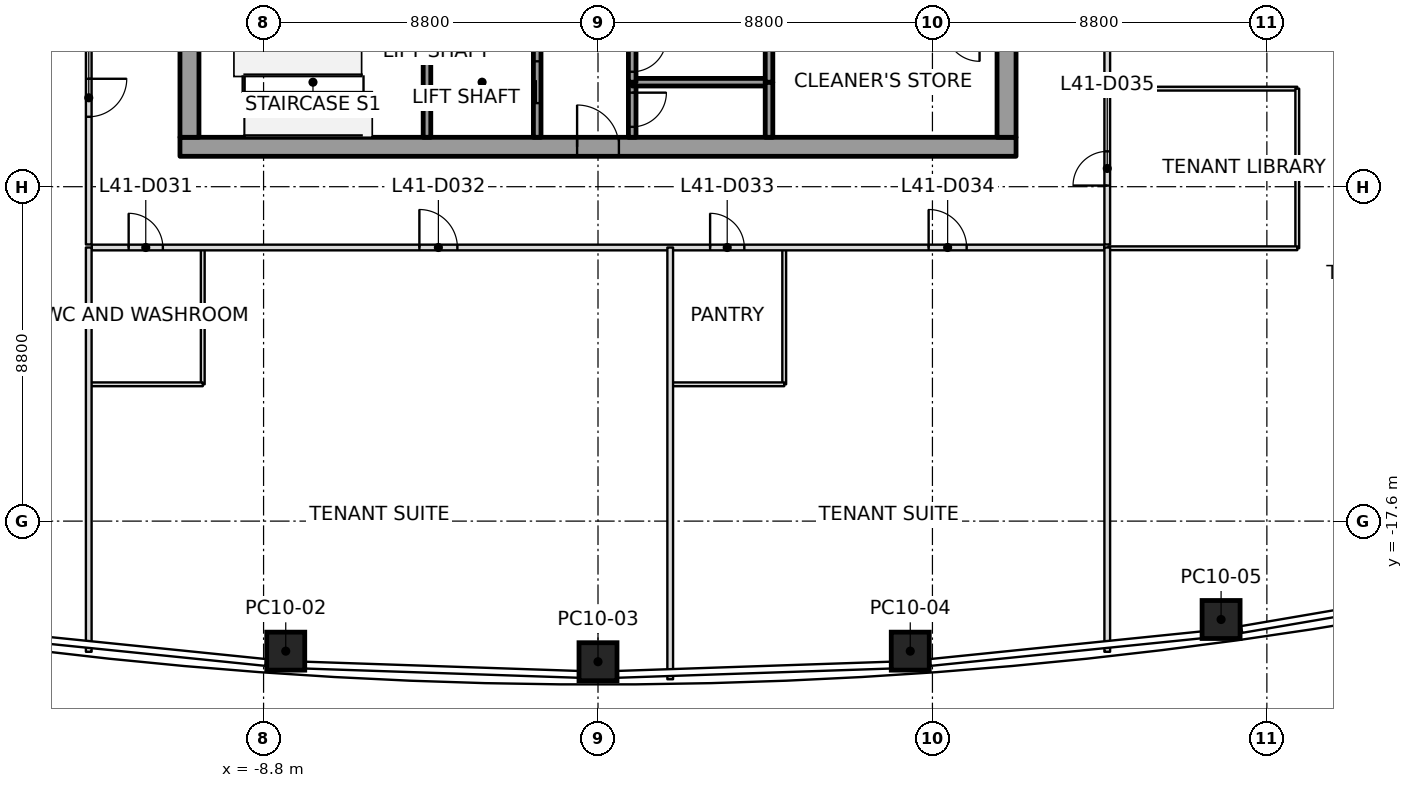
"""IFC4 building model, lengths in metres.
Left out: names, types, materials, properties, quantities, classifications, styles, units other than length and angle.
Written with IfcOpenShell. Run it as: python <this file> out.ifc"""

import sys

from ifc_helpers import new_model, si_unit, direction, frame, frame_2d, origin, origin_2d, place, context, subcontext, project, spatial, rectangle, extrude, element, fill, save


model = new_model("IFC4")
c1 = context("Model", 3, precision=1e-05, world=origin(), true_north=direction((0.0, 1.0)))
c2 = subcontext(c1, "Body", "Model", "MODEL_VIEW")
j1 = project(units=[si_unit("LENGTHUNIT", "METRE"), si_unit("PLANEANGLEUNIT", "RADIAN")], contexts=[c1])
p1 = place(None, origin())
s1 = spatial("IfcSite", under=j1, at=p1, CompositionType="ELEMENT")
p2 = place(p1, origin())
s2 = spatial("IfcBuilding", under=s1, at=p2, CompositionType="ELEMENT")
p3 = place(p2, frame((0.0, 0.0, 185.8)))
s3 = spatial("IfcBuildingStorey", under=s2, at=p3, CompositionType="ELEMENT", Elevation=185.8)
p4 = place(p3, frame((-8.217, -21.022, 0.0), z_axis=(0.008849199152, 0.01116829962, 0.999898475225), x_axis=(-0.99767373409, 0.067690026589, 0.008073450719)))
e1 = element("IfcColumn", 1, at=p4, inside=s3, PredefinedType="COLUMN", context=c2, shape_type="SweptSolid", body=[
    extrude(rectangle(XDim=1.0, YDim=1.0, at=origin_2d()), origin(), (0.0, 0.0, 1.0), 4.0),
])
p5 = place(p3, frame((0.0, -21.3, 0.0), z_axis=(0.0, 0.01141283087, 0.999934871525), x_axis=(1.0, 0.0, 0.0)))
e2 = element("IfcColumn", 2, at=p5, inside=s3, PredefinedType="COLUMN", context=c2, shape_type="SweptSolid", body=[
    extrude(rectangle(XDim=1.0, YDim=1.0, at=origin_2d()), origin(), (0.0, 0.0, 1.0), 4.0),
])
p6 = place(p3, frame((8.217, -21.022, 0.0), z_axis=(-0.008849199152, 0.01116829962, 0.999898475225), x_axis=(0.99767373409, 0.067690026589, 0.008073450719)))
e3 = element("IfcColumn", 3, at=p6, inside=s3, PredefinedType="COLUMN", context=c2, shape_type="SweptSolid", body=[
    extrude(rectangle(XDim=1.0, YDim=1.0, at=origin_2d()), origin(), (0.0, 0.0, 1.0), 4.0),
])
p7 = place(p3, frame((16.396, -20.189, 0.0), z_axis=(-0.017635456472, 0.010434820265, 0.999790030557), x_axis=(0.990707564841, 0.135057082861, 0.016065657048)))
e4 = element("IfcColumn", 4, at=p7, inside=s3, PredefinedType="COLUMN", context=c2, shape_type="SweptSolid", body=[
    extrude(rectangle(XDim=1.0, YDim=1.0, at=origin_2d()), origin(), (0.0, 0.0, 1.0), 4.001),
])
p8 = place(p3, frame((-11.0, -7.75, 0.0), z_axis=(0.0, 0.0, 1.0), x_axis=(1.0, 0.0, 0.0)))
e5 = element("IfcWall", 5, at=p8, inside=s3, PredefinedType="SHEAR", context=c2, shape_type="SweptSolid", body=[
    extrude(rectangle(XDim=22.0, YDim=0.5, at=frame_2d((11.0, 0.0))), origin(), (0.0, 0.0, 1.0), 4.0),
])
p9 = place(p8, frame((10.45, 0.0, 0.0)))
e6 = element("IfcOpeningElement", 6, at=p9, cuts=e5, PredefinedType="OPENING", context=c2, shape_type="SweptSolid", body=[
    extrude(rectangle(XDim=1.1, YDim=2.1, at=frame_2d((0.55, 1.05))), frame((0.0, 0.25, 0.0), z_axis=(0.0, -1.0, 0.0), x_axis=(1.0, 0.0, 0.0)), (0.0, 0.0, 1.0), 0.5),
])
p10 = place(p3, frame((-10.75, -7.5, 0.0), z_axis=(0.0, 0.0, 1.0), x_axis=(0.0, 1.0, 0.0)))
e7 = element("IfcWall", 7, at=p10, inside=s3, PredefinedType="SHEAR", context=c2, shape_type="SweptSolid", body=[
    extrude(rectangle(XDim=15.0, YDim=0.5, at=frame_2d((7.5, 0.0))), origin(), (0.0, 0.0, 1.0), 4.0),
])
p11 = place(p10, frame((6.6, 0.0, 0.0)))
e8 = element("IfcOpeningElement", 8, at=p11, cuts=e7, PredefinedType="OPENING", context=c2, shape_type="SweptSolid", body=[
    extrude(rectangle(XDim=1.8, YDim=2.1, at=frame_2d((0.9, 1.05))), frame((0.0, 0.25, 0.0), z_axis=(0.0, -1.0, 0.0), x_axis=(1.0, 0.0, 0.0)), (0.0, 0.0, 1.0), 0.5),
])
p12 = place(p3, frame((10.75, -7.5, 0.0), z_axis=(0.0, 0.0, 1.0), x_axis=(0.0, 1.0, 0.0)))
e9 = element("IfcWall", 9, at=p12, inside=s3, PredefinedType="SHEAR", context=c2, shape_type="SweptSolid", body=[
    extrude(rectangle(XDim=15.0, YDim=0.5, at=frame_2d((7.5, 0.0))), origin(), (0.0, 0.0, 1.0), 4.0),
])
p13 = place(p12, frame((6.6, 0.0, 0.0)))
e10 = element("IfcOpeningElement", 10, at=p13, cuts=e9, PredefinedType="OPENING", context=c2, shape_type="SweptSolid", body=[
    extrude(rectangle(XDim=1.8, YDim=2.1, at=frame_2d((0.9, 1.05))), frame((0.0, 0.25, 0.0), z_axis=(0.0, -1.0, 0.0), x_axis=(1.0, 0.0, 0.0)), (0.0, 0.0, 1.0), 0.5),
])
p14 = place(p3, frame((-4.5, -4.6, 0.0), z_axis=(0.0, 0.0, 1.0), x_axis=(0.0, -1.0, 0.0)))
e11 = element("IfcWall", 11, at=p14, inside=s3, PredefinedType="SOLIDWALL", context=c2, shape_type="SweptSolid", body=[
    extrude(rectangle(XDim=2.9, YDim=0.2, at=frame_2d((1.45, 0.0))), origin(), (0.0, 0.0, 1.0), 3.85),
])
p15 = place(p3, frame((-1.6, -7.5, 0.0), z_axis=(0.0, 0.0, 1.0), x_axis=(0.0, 1.0, 0.0)))
e12 = element("IfcWall", 12, at=p15, inside=s3, PredefinedType="SOLIDWALL", context=c2, shape_type="SweptSolid", body=[
    extrude(rectangle(XDim=2.9, YDim=0.2, at=frame_2d((1.45, 0.0))), origin(), (0.0, 0.0, 1.0), 3.85),
])
p16 = place(p15, frame((0.9, 0.0, 0.0)))
e13 = element("IfcOpeningElement", 13, at=p16, cuts=e12, PredefinedType="OPENING", context=c2, shape_type="SweptSolid", body=[
    extrude(rectangle(XDim=1.1, YDim=2.1, at=frame_2d((0.55, 1.05))), frame((0.0, 0.1, 0.0), z_axis=(0.0, -1.0, 0.0), x_axis=(1.0, 0.0, 0.0)), (0.0, 0.0, 1.0), 0.2),
])
p17 = place(p3, frame((0.9, -6.05, 0.0), z_axis=(0.0, 0.0, 1.0), x_axis=(0.0, -1.0, 0.0)))
e14 = element("IfcWall", 14, at=p17, inside=s3, PredefinedType="SOLIDWALL", context=c2, shape_type="SweptSolid", body=[
    extrude(rectangle(XDim=1.45, YDim=0.2, at=frame_2d((0.725, 0.0))), origin(), (0.0, 0.0, 1.0), 3.85),
])
p18 = place(p17, frame((0.275, 0.0, 0.0)))
e15 = element("IfcOpeningElement", 15, at=p18, cuts=e14, PredefinedType="OPENING", context=c2, shape_type="SweptSolid", body=[
    extrude(rectangle(XDim=0.9, YDim=2.1, at=frame_2d((0.45, 1.05))), frame((0.0, 0.1, 0.0), z_axis=(0.0, -1.0, 0.0), x_axis=(1.0, 0.0, 0.0)), (0.0, 0.0, 1.0), 0.2),
])
p19 = place(p3, frame((4.5, -6.05, 0.0), z_axis=(0.0, 0.0, 1.0), x_axis=(-1.0, 0.0, 0.0)))
e16 = element("IfcWall", 16, at=p19, inside=s3, PredefinedType="SOLIDWALL", context=c2, shape_type="SweptSolid", body=[
    extrude(rectangle(XDim=3.6, YDim=0.2, at=frame_2d((1.8, 0.0))), origin(), (0.0, 0.0, 1.0), 3.85),
])
p20 = place(p3, frame((0.9, -4.6, 0.0), z_axis=(0.0, 0.0, 1.0), x_axis=(0.0, -1.0, 0.0)))
e17 = element("IfcWall", 17, at=p20, inside=s3, PredefinedType="SOLIDWALL", context=c2, shape_type="SweptSolid", body=[
    extrude(rectangle(XDim=1.45, YDim=0.2, at=frame_2d((0.725, 0.0))), origin(), (0.0, 0.0, 1.0), 3.85),
])
p21 = place(p20, frame((0.275, 0.0, 0.0)))
e18 = element("IfcOpeningElement", 18, at=p21, cuts=e17, PredefinedType="OPENING", context=c2, shape_type="SweptSolid", body=[
    extrude(rectangle(XDim=0.9, YDim=2.1, at=frame_2d((0.45, 1.05))), frame((0.0, 0.1, 0.0), z_axis=(0.0, -1.0, 0.0), x_axis=(1.0, 0.0, 0.0)), (0.0, 0.0, 1.0), 0.2),
])
for number, where, z_axis, x_axis in (
    (19, (4.5, -6.05, 0.0), (0.0, 0.0, 1.0), (0.0, -1.0, 0.0)),
    (20, (4.5, -4.6, 0.0), (0.0, 0.0, 1.0), (0.0, -1.0, 0.0)),
):
    element("IfcWall", number, at=place(p3, frame(where, z_axis=z_axis, x_axis=x_axis)), inside=s3, PredefinedType="SOLIDWALL", context=c2, shape_type="SweptSolid", body=[
        extrude(rectangle(XDim=1.45, YDim=0.2, at=frame_2d((0.725, 0.0))), origin(), (0.0, 0.0, 1.0), 3.85),
    ])
p22 = place(p3, frame((-13.4, -10.4, 0.0), z_axis=(0.0, 0.0, 1.0), x_axis=(0.0, -1.0, 0.0)))
e21 = element("IfcWall", 21, at=p22, inside=s3, PredefinedType="PARTITIONING", context=c2, shape_type="SweptSolid", body=[
    extrude(rectangle(XDim=10.639, YDim=0.15, at=frame_2d((5.319, 0.0))), origin(), (0.0, 0.0, 1.0), 3.234),
])
p23 = place(p3, frame((1.9, -10.4, 0.0), z_axis=(0.0, 0.0, 1.0), x_axis=(0.0, -1.0, 0.0)))
e22 = element("IfcWall", 22, at=p23, inside=s3, PredefinedType="PARTITIONING", context=c2, shape_type="SweptSolid", body=[
    extrude(rectangle(XDim=11.361, YDim=0.15, at=frame_2d((5.681, 0.0))), origin(), (0.0, 0.0, 1.0), 3.234),
])
p24 = place(p3, frame((13.4, -10.4, 0.0), z_axis=(0.0, 0.0, 1.0), x_axis=(0.0, -1.0, 0.0)))
e23 = element("IfcWall", 23, at=p24, inside=s3, PredefinedType="PARTITIONING", context=c2, shape_type="SweptSolid", body=[
    extrude(rectangle(XDim=10.639, YDim=0.15, at=frame_2d((5.319, 0.0))), origin(), (0.0, 0.0, 1.0), 3.234),
])
p25 = place(p3, frame((-13.4, 10.32, 0.0), z_axis=(0.0, 0.0, 1.0), x_axis=(0.0, -1.0, 0.0)))
e24 = element("IfcWall", 24, at=p25, inside=s3, PredefinedType="PARTITIONING", context=c2, shape_type="SweptSolid", body=[
    extrude(rectangle(XDim=20.64, YDim=0.15, at=frame_2d((10.32, 0.0))), origin(), (0.0, 0.0, 1.0), 3.097),
])
p26 = place(p25, frame((3.32, 0.0, 0.0)))
e25 = element("IfcOpeningElement", 25, at=p26, cuts=e24, PredefinedType="OPENING", context=c2, shape_type="SweptSolid", body=[
    extrude(rectangle(XDim=1.0, YDim=2.1, at=frame_2d((0.5, 1.05))), frame((0.0, 0.075, 0.0), z_axis=(0.0, -1.0, 0.0), x_axis=(1.0, 0.0, 0.0)), (0.0, 0.0, 1.0), 0.15),
])
p27 = place(p25, frame((9.77, 0.0, 0.0)))
e26 = element("IfcOpeningElement", 26, at=p27, cuts=e24, PredefinedType="OPENING", context=c2, shape_type="SweptSolid", body=[
    extrude(rectangle(XDim=0.9, YDim=2.1, at=frame_2d((0.45, 1.05))), frame((0.0, 0.075, 0.0), z_axis=(0.0, -1.0, 0.0), x_axis=(1.0, 0.0, 0.0)), (0.0, 0.0, 1.0), 0.15),
])
p28 = place(p25, frame((16.28, 0.0, 0.0)))
e27 = element("IfcOpeningElement", 27, at=p28, cuts=e24, PredefinedType="OPENING", context=c2, shape_type="SweptSolid", body=[
    extrude(rectangle(XDim=1.0, YDim=2.1, at=frame_2d((0.5, 1.05))), frame((0.0, 0.075, 0.0), z_axis=(0.0, -1.0, 0.0), x_axis=(1.0, 0.0, 0.0)), (0.0, 0.0, 1.0), 0.15),
])
p29 = place(p3, frame((-13.32, -10.4, 0.0), z_axis=(0.0, 0.0, 1.0), x_axis=(1.0, 0.0, 0.0)))
e28 = element("IfcWall", 28, at=p29, inside=s3, PredefinedType="PARTITIONING", context=c2, shape_type="SweptSolid", body=[
    extrude(rectangle(XDim=26.64, YDim=0.15, at=frame_2d((13.32, 0.0))), origin(), (0.0, 0.0, 1.0), 3.3),
])
p30 = place(p29, frame((0.97, 0.0, 0.0)))
e29 = element("IfcOpeningElement", 29, at=p30, cuts=e28, PredefinedType="OPENING", context=c2, shape_type="SweptSolid", body=[
    extrude(rectangle(XDim=0.9, YDim=2.1, at=frame_2d((0.45, 1.05))), frame((0.0, 0.075, 0.0), z_axis=(0.0, -1.0, 0.0), x_axis=(1.0, 0.0, 0.0)), (0.0, 0.0, 1.0), 0.15),
])
p31 = place(p29, frame((8.62, 0.0, 0.0)))
e30 = element("IfcOpeningElement", 30, at=p31, cuts=e28, PredefinedType="OPENING", context=c2, shape_type="SweptSolid", body=[
    extrude(rectangle(XDim=1.0, YDim=2.1, at=frame_2d((0.5, 1.05))), frame((0.0, 0.075, 0.0), z_axis=(0.0, -1.0, 0.0), x_axis=(1.0, 0.0, 0.0)), (0.0, 0.0, 1.0), 0.15),
])
p32 = place(p29, frame((16.27, 0.0, 0.0)))
e31 = element("IfcOpeningElement", 31, at=p32, cuts=e28, PredefinedType="OPENING", context=c2, shape_type="SweptSolid", body=[
    extrude(rectangle(XDim=0.9, YDim=2.1, at=frame_2d((0.45, 1.05))), frame((0.0, 0.075, 0.0), z_axis=(0.0, -1.0, 0.0), x_axis=(1.0, 0.0, 0.0)), (0.0, 0.0, 1.0), 0.15),
])
p33 = place(p29, frame((22.02, 0.0, 0.0)))
e32 = element("IfcOpeningElement", 32, at=p33, cuts=e28, PredefinedType="OPENING", context=c2, shape_type="SweptSolid", body=[
    extrude(rectangle(XDim=1.0, YDim=2.1, at=frame_2d((0.5, 1.05))), frame((0.0, 0.075, 0.0), z_axis=(0.0, -1.0, 0.0), x_axis=(1.0, 0.0, 0.0)), (0.0, 0.0, 1.0), 0.15),
])
p34 = place(p3, frame((13.4, -10.32, 0.0), z_axis=(0.0, 0.0, 1.0), x_axis=(0.0, 1.0, 0.0)))
e33 = element("IfcWall", 33, at=p34, inside=s3, PredefinedType="PARTITIONING", context=c2, shape_type="SweptSolid", body=[
    extrude(rectangle(XDim=20.64, YDim=0.15, at=frame_2d((10.32, 0.0))), origin(), (0.0, 0.0, 1.0), 3.166),
])
p35 = place(p34, frame((10.57, 0.0, 0.0)))
e34 = element("IfcOpeningElement", 34, at=p35, cuts=e33, PredefinedType="OPENING", context=c2, shape_type="SweptSolid", body=[
    extrude(rectangle(XDim=0.9, YDim=2.1, at=frame_2d((0.45, 1.05))), frame((0.0, 0.075, 0.0), z_axis=(0.0, -1.0, 0.0), x_axis=(1.0, 0.0, 0.0)), (0.0, 0.0, 1.0), 0.15),
])
p36 = place(p34, frame((16.32, 0.0, 0.0)))
e35 = element("IfcOpeningElement", 35, at=p36, cuts=e33, PredefinedType="OPENING", context=c2, shape_type="SweptSolid", body=[
    extrude(rectangle(XDim=1.0, YDim=2.1, at=frame_2d((0.5, 1.05))), frame((0.0, 0.075, 0.0), z_axis=(0.0, -1.0, 0.0), x_axis=(1.0, 0.0, 0.0)), (0.0, 0.0, 1.0), 0.15),
])
p37 = place(p34, frame((1.55, 0.0, 0.0)))
e36 = element("IfcOpeningElement", 36, at=p37, cuts=e33, PredefinedType="OPENING", context=c2, shape_type="SweptSolid", body=[
    extrude(rectangle(XDim=0.9, YDim=2.1, at=frame_2d((0.45, 1.05))), frame((0.0, 0.075, 0.0), z_axis=(0.0, -1.0, 0.0), x_axis=(1.0, 0.0, 0.0)), (0.0, 0.0, 1.0), 0.15),
])
p38 = place(p34, frame((6.21, 0.0, 0.0)))
e37 = element("IfcOpeningElement", 37, at=p38, cuts=e33, PredefinedType="OPENING", context=c2, shape_type="SweptSolid", body=[
    extrude(rectangle(XDim=1.0, YDim=2.1, at=frame_2d((0.5, 1.05))), frame((0.0, 0.075, 0.0), z_axis=(0.0, -1.0, 0.0), x_axis=(1.0, 0.0, 0.0)), (0.0, 0.0, 1.0), 0.15),
])
p39 = place(p3, frame((-10.4, -10.43, 0.0), z_axis=(0.0, 0.0, 1.0), x_axis=(0.0, -1.0, 0.0)))
e38 = element("IfcWall", 38, at=p39, inside=s3, PredefinedType="PARTITIONING", context=c2, shape_type="SweptSolid", body=[
    extrude(rectangle(XDim=3.57, YDim=0.1, at=frame_2d((1.785, 0.0))), origin(), (0.0, 0.0, 1.0), 3.3),
])
p40 = place(p3, frame((-10.4, -14.0, 0.0), z_axis=(0.0, 0.0, 1.0), x_axis=(-1.0, 0.0, 0.0)))
e39 = element("IfcWall", 39, at=p40, inside=s3, PredefinedType="PARTITIONING", context=c2, shape_type="SweptSolid", body=[
    extrude(rectangle(XDim=2.97, YDim=0.1, at=frame_2d((1.485, 0.0))), origin(), (0.0, 0.0, 1.0), 3.3),
])
p41 = place(p3, frame((4.9, -10.43, 0.0), z_axis=(0.0, 0.0, 1.0), x_axis=(0.0, -1.0, 0.0)))
e40 = element("IfcWall", 40, at=p41, inside=s3, PredefinedType="PARTITIONING", context=c2, shape_type="SweptSolid", body=[
    extrude(rectangle(XDim=3.57, YDim=0.1, at=frame_2d((1.785, 0.0))), origin(), (0.0, 0.0, 1.0), 3.3),
])
p42 = place(p3, frame((4.9, -14.0, 0.0), z_axis=(0.0, 0.0, 1.0), x_axis=(-1.0, 0.0, 0.0)))
e41 = element("IfcWall", 41, at=p42, inside=s3, PredefinedType="PARTITIONING", context=c2, shape_type="SweptSolid", body=[
    extrude(rectangle(XDim=2.97, YDim=0.1, at=frame_2d((1.485, 0.0))), origin(), (0.0, 0.0, 1.0), 3.3),
])
p43 = place(p3, frame((13.43, -6.22, 0.0), z_axis=(0.0, 0.0, 1.0), x_axis=(1.0, 0.0, 0.0)))
e42 = element("IfcWall", 42, at=p43, inside=s3, PredefinedType="PARTITIONING", context=c2, shape_type="SweptSolid", body=[
    extrude(rectangle(XDim=4.97, YDim=0.1, at=frame_2d((2.485, 0.0))), origin(), (0.0, 0.0, 1.0), 3.247),
])
p44 = place(p3, frame((18.4, -6.22, 0.0), z_axis=(0.0, 0.0, 1.0), x_axis=(0.0, -1.0, 0.0)))
e43 = element("IfcWall", 43, at=p44, inside=s3, PredefinedType="PARTITIONING", context=c2, shape_type="SweptSolid", body=[
    extrude(rectangle(XDim=4.2, YDim=0.1, at=frame_2d((2.1, 0.0))), origin(), (0.0, 0.0, 1.0), 3.3),
])
p45 = place(p3, frame((18.4, -10.42, 0.0), z_axis=(0.0, 0.0, 1.0), x_axis=(-1.0, 0.0, 0.0)))
e44 = element("IfcWall", 44, at=p45, inside=s3, PredefinedType="PARTITIONING", context=c2, shape_type="SweptSolid", body=[
    extrude(rectangle(XDim=4.97, YDim=0.1, at=frame_2d((2.485, 0.0))), origin(), (0.0, 0.0, 1.0), 3.166),
])
p46 = place(p28, origin())
e45 = element("IfcDoor", 45, at=p46, inside=s3, OperationType="SINGLE_SWING_LEFT", PredefinedType="DOOR", context=c2, shape_type="SweptSolid", body=[
    extrude(rectangle(XDim=1.0, YDim=2.1, at=frame_2d((0.5, 1.05))), frame((0.0, 0.025, 0.0), z_axis=(0.0, -1.0, 0.0), x_axis=(1.0, 0.0, 0.0)), (0.0, 0.0, 1.0), 0.05),
])
fill(e27, e45)
p47 = place(p30, origin())
e46 = element("IfcDoor", 46, at=p47, inside=s3, OperationType="SINGLE_SWING_LEFT", PredefinedType="DOOR", context=c2, shape_type="SweptSolid", body=[
    extrude(rectangle(XDim=0.9, YDim=2.1, at=frame_2d((0.45, 1.05))), frame((0.0, 0.025, 0.0), z_axis=(0.0, -1.0, 0.0), x_axis=(1.0, 0.0, 0.0)), (0.0, 0.0, 1.0), 0.05),
])
fill(e29, e46)
p48 = place(p31, origin())
e47 = element("IfcDoor", 47, at=p48, inside=s3, OperationType="SINGLE_SWING_LEFT", PredefinedType="DOOR", context=c2, shape_type="SweptSolid", body=[
    extrude(rectangle(XDim=1.0, YDim=2.1, at=frame_2d((0.5, 1.05))), frame((0.0, 0.025, 0.0), z_axis=(0.0, -1.0, 0.0), x_axis=(1.0, 0.0, 0.0)), (0.0, 0.0, 1.0), 0.05),
])
fill(e30, e47)
p49 = place(p32, origin())
e48 = element("IfcDoor", 48, at=p49, inside=s3, OperationType="SINGLE_SWING_LEFT", PredefinedType="DOOR", context=c2, shape_type="SweptSolid", body=[
    extrude(rectangle(XDim=0.9, YDim=2.1, at=frame_2d((0.45, 1.05))), frame((0.0, 0.025, 0.0), z_axis=(0.0, -1.0, 0.0), x_axis=(1.0, 0.0, 0.0)), (0.0, 0.0, 1.0), 0.05),
])
fill(e31, e48)
p50 = place(p33, origin())
e49 = element("IfcDoor", 49, at=p50, inside=s3, OperationType="SINGLE_SWING_RIGHT", PredefinedType="DOOR", context=c2, shape_type="SweptSolid", body=[
    extrude(rectangle(XDim=1.0, YDim=2.1, at=frame_2d((0.5, 1.05))), frame((0.0, 0.025, 0.0), z_axis=(0.0, -1.0, 0.0), x_axis=(1.0, 0.0, 0.0)), (0.0, 0.0, 1.0), 0.05),
])
fill(e32, e49)
p51 = place(p37, origin())
e50 = element("IfcDoor", 50, at=p51, inside=s3, OperationType="SINGLE_SWING_LEFT", PredefinedType="DOOR", context=c2, shape_type="SweptSolid", body=[
    extrude(rectangle(XDim=0.9, YDim=2.1, at=frame_2d((0.45, 1.05))), frame((0.0, 0.025, 0.0), z_axis=(0.0, -1.0, 0.0), x_axis=(1.0, 0.0, 0.0)), (0.0, 0.0, 1.0), 0.05),
])
fill(e36, e50)
p52 = place(p16, origin())
e51 = element("IfcDoor", 51, at=p52, inside=s3, OperationType="SLIDING_TO_RIGHT", PredefinedType="DOOR", context=c2, shape_type="SweptSolid", body=[
    extrude(rectangle(XDim=1.1, YDim=2.1, at=frame_2d((0.55, 1.05))), frame((0.0, 0.025, 0.0), z_axis=(0.0, -1.0, 0.0), x_axis=(1.0, 0.0, 0.0)), (0.0, 0.0, 1.0), 0.05),
])
fill(e13, e51)
p53 = place(p18, origin())
e52 = element("IfcDoor", 52, at=p53, inside=s3, OperationType="SINGLE_SWING_LEFT", PredefinedType="DOOR", context=c2, shape_type="SweptSolid", body=[
    extrude(rectangle(XDim=0.9, YDim=2.1, at=frame_2d((0.45, 1.05))), frame((0.0, 0.025, 0.0), z_axis=(0.0, -1.0, 0.0), x_axis=(1.0, 0.0, 0.0)), (0.0, 0.0, 1.0), 0.05),
])
fill(e15, e52)
p54 = place(p21, origin())
e53 = element("IfcDoor", 53, at=p54, inside=s3, OperationType="SINGLE_SWING_RIGHT", PredefinedType="DOOR", context=c2, shape_type="SweptSolid", body=[
    extrude(rectangle(XDim=0.9, YDim=2.1, at=frame_2d((0.45, 1.05))), frame((0.0, 0.025, 0.0), z_axis=(0.0, -1.0, 0.0), x_axis=(1.0, 0.0, 0.0)), (0.0, 0.0, 1.0), 0.05),
])
fill(e18, e53)
p55 = place(p9, origin())
e54 = element("IfcDoor", 54, at=p55, inside=s3, OperationType="SINGLE_SWING_RIGHT", PredefinedType="DOOR", context=c2, shape_type="SweptSolid", body=[
    extrude(rectangle(XDim=1.1, YDim=2.1, at=frame_2d((0.55, 1.05))), frame((0.0, 0.025, 0.0), z_axis=(0.0, -1.0, 0.0), x_axis=(1.0, 0.0, 0.0)), (0.0, 0.0, 1.0), 0.05),
])
fill(e6, e54)
save(model, sys.argv[1])
